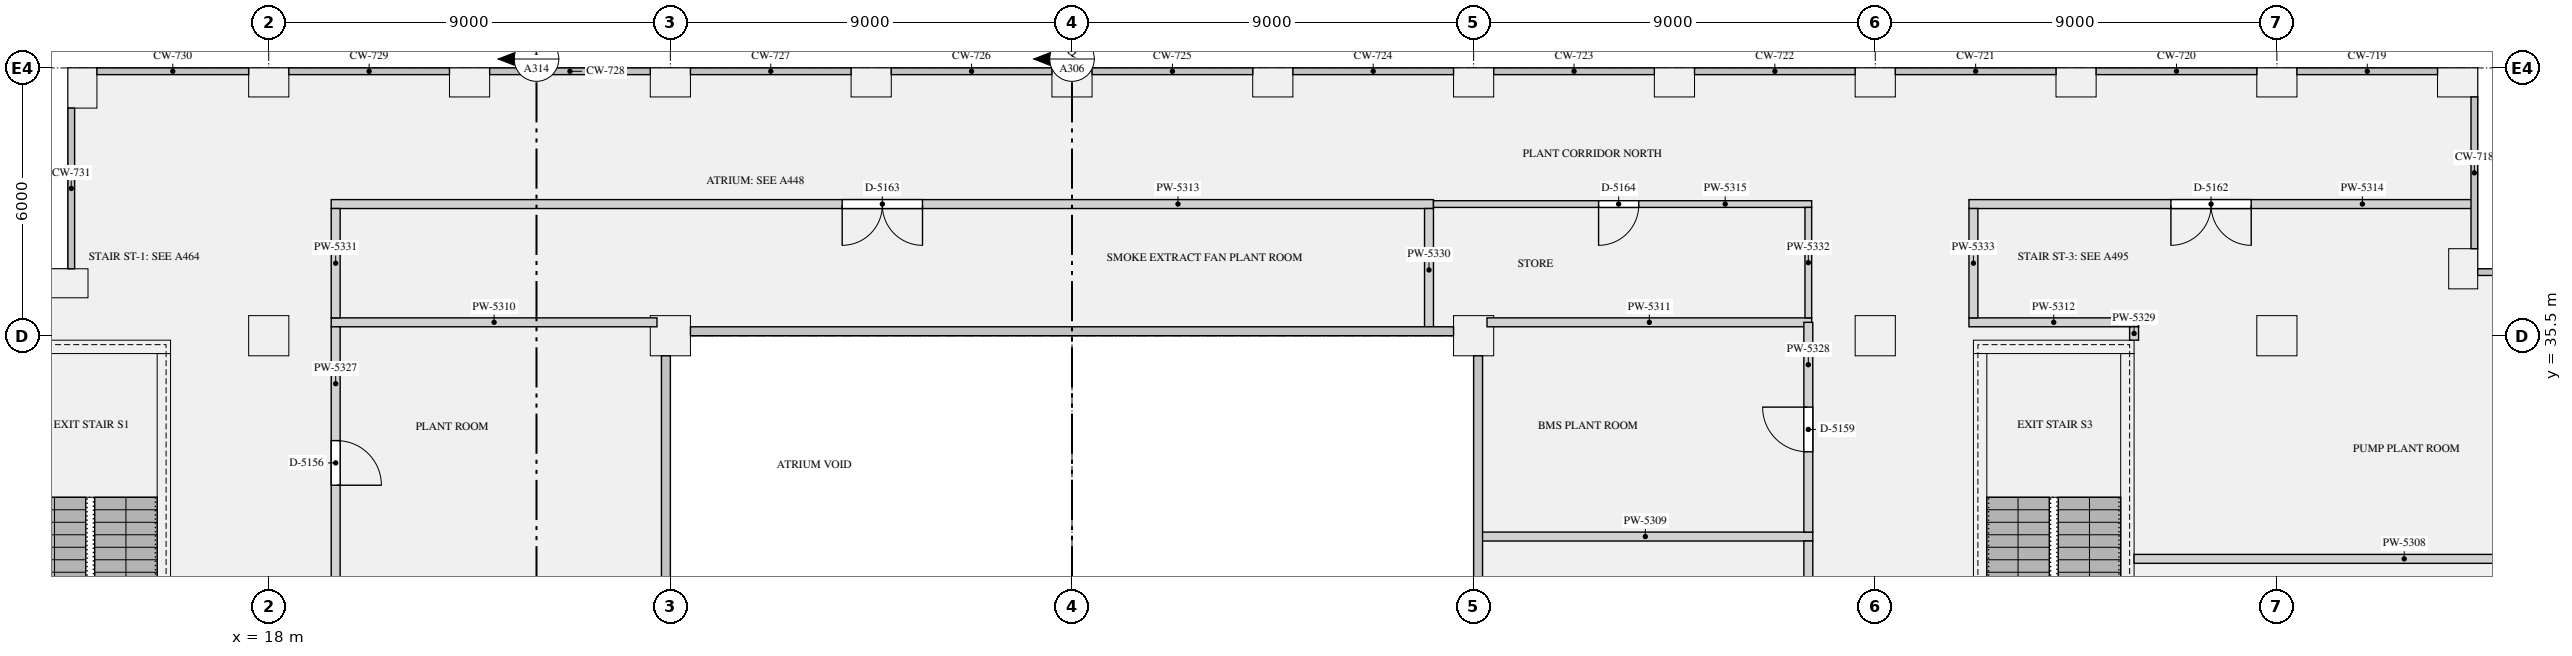
"""IFC4 building model, lengths in metres.
Left out: names, types, materials, properties, quantities, classifications, styles, units other than length and angle.
Written with IfcOpenShell. Run it as: python <this file> out.ifc"""

import sys

from ifc_helpers import new_model, si_unit, direction, frame, frame_2d, origin, origin_2d, place, context, subcontext, project, spatial, rectangle, extrude, element, fill, save


model = new_model("IFC4")
c1 = context("Model", 3, precision=1e-05, world=origin(), true_north=direction((0.0, 1.0)))
c2 = subcontext(c1, "Body", "Model", "MODEL_VIEW")
j1 = project(units=[si_unit("LENGTHUNIT", "METRE"), si_unit("PLANEANGLEUNIT", "RADIAN")], contexts=[c1])
p1 = place(None, origin())
s1 = spatial("IfcSite", under=j1, at=p1, CompositionType="ELEMENT")
p2 = place(p1, origin())
s2 = spatial("IfcBuilding", under=s1, at=p2, CompositionType="ELEMENT")
p3 = place(p2, frame((0.0, 0.0, 235.8)))
s3 = spatial("IfcBuildingStorey", under=s2, at=p3, CompositionType="ELEMENT", Elevation=235.8)
for number, where, z_axis, x_axis in (
    (1, (67.175, 37.0, 0.0), (0.0, 0.0, 1.0), (0.0, 1.0, 0.0)),
    (2, (67.05, 41.175, 0.0), (0.0, 0.0, 1.0), (-1.0, 0.0, 0.0)),
    (3, (63.0, 41.175, 0.0), (0.0, 0.0, 1.0), (-1.0, 0.0, 0.0)),
    (4, (58.5, 41.175, 0.0), (0.0, 0.0, 1.0), (-1.0, 0.0, 0.0)),
    (5, (54.0, 41.175, 0.0), (0.0, 0.0, 1.0), (-1.0, 0.0, 0.0)),
    (6, (49.5, 41.175, 0.0), (0.0, 0.0, 1.0), (-1.0, 0.0, 0.0)),
    (7, (45.0, 41.175, 0.0), (0.0, 0.0, 1.0), (-1.0, 0.0, 0.0)),
    (8, (40.5, 41.175, 0.0), (0.0, 0.0, 1.0), (-1.0, 0.0, 0.0)),
    (9, (36.0, 41.175, 0.0), (0.0, 0.0, 1.0), (-1.0, 0.0, 0.0)),
    (10, (31.5, 41.175, 0.0), (0.0, 0.0, 1.0), (-1.0, 0.0, 0.0)),
    (11, (27.0, 41.175, 0.0), (0.0, 0.0, 1.0), (-1.0, 0.0, 0.0)),
    (12, (22.5, 41.175, 0.0), (0.0, 0.0, 1.0), (-1.0, 0.0, 0.0)),
    (13, (18.0, 41.175, 0.0), (0.0, 0.0, 1.0), (-1.0, 0.0, 0.0)),
    (14, (13.825, 41.05, 0.0), (0.0, 0.0, 1.0), (0.0, -1.0, 0.0)),
    (15, (13.5, 36.675, 0.0), (0.0, 0.0, 1.0), (-1.0, 0.0, 0.0)),
):
    element("IfcColumn", number, at=place(p3, frame(where, z_axis=z_axis, x_axis=x_axis)), inside=s3, PredefinedType="USERDEFINED", context=c2, shape_type="SweptSolid", body=[
        extrude(rectangle(XDim=0.9, YDim=0.65, at=origin_2d()), origin(), (0.0, 0.0, 1.0), 4.2),
    ])
for number, where, z_axis, x_axis in (
    (16, (18.0, 35.5, 0.0), (0.0, 0.0, 1.0), (1.0, 0.0, 0.0)),
    (17, (27.0, 35.5, 0.0), (0.0, 0.0, 1.0), (1.0, 0.0, 0.0)),
    (18, (45.0, 35.5, 0.0), (0.0, 0.0, 1.0), (1.0, 0.0, 0.0)),
    (19, (54.0, 35.5, 0.0), (0.0, 0.0, 1.0), (1.0, 0.0, 0.0)),
    (20, (63.0, 35.5, 0.0), (0.0, 0.0, 1.0), (1.0, 0.0, 0.0)),
):
    element("IfcColumn", number, at=place(p3, frame(where, z_axis=z_axis, x_axis=x_axis)), inside=s3, PredefinedType="COLUMN", context=c2, shape_type="SweptSolid", body=[
        extrude(rectangle(XDim=0.9, YDim=0.9, at=origin_2d()), origin(), (0.0, 0.0, 1.0), 4.2),
    ])
p4 = place(p3, frame((12.2, 35.25, 0.0), z_axis=(0.0, 0.0, 1.0), x_axis=(1.0, 0.0, 0.0)))
e21 = element("IfcWall", 21, at=p4, inside=s3, PredefinedType="SHEAR", context=c2, shape_type="SweptSolid", body=[
    extrude(rectangle(XDim=3.6, YDim=0.3, at=frame_2d((1.8, 0.0))), origin(), (0.0, 0.0, 1.0), 4.2),
])
p5 = place(p3, frame((15.65, 27.3, 0.0), z_axis=(0.0, 0.0, 1.0), x_axis=(0.0, 1.0, 0.0)))
e22 = element("IfcWall", 22, at=p5, inside=s3, PredefinedType="SHEAR", context=c2, shape_type="SweptSolid", body=[
    extrude(rectangle(XDim=7.8, YDim=0.3, at=frame_2d((3.9, 0.0))), origin(), (0.0, 0.0, 1.0), 4.2),
])
p6 = place(p3, frame((56.2, 35.25, 0.0), z_axis=(0.0, 0.0, 1.0), x_axis=(1.0, 0.0, 0.0)))
e23 = element("IfcWall", 23, at=p6, inside=s3, PredefinedType="SHEAR", context=c2, shape_type="SweptSolid", body=[
    extrude(rectangle(XDim=3.6, YDim=0.3, at=frame_2d((1.8, 0.0))), origin(), (0.0, 0.0, 1.0), 4.2),
])
for number, where, z_axis, x_axis in (
    (24, (56.35, 27.3, 0.0), (0.0, 0.0, 1.0), (0.0, 1.0, 0.0)),
    (25, (59.65, 27.3, 0.0), (0.0, 0.0, 1.0), (0.0, 1.0, 0.0)),
):
    element("IfcWall", number, at=place(p3, frame(where, z_axis=z_axis, x_axis=x_axis)), inside=s3, PredefinedType="SHEAR", context=c2, shape_type="SweptSolid", body=[
        extrude(rectangle(XDim=7.8, YDim=0.3, at=frame_2d((3.9, 0.0))), origin(), (0.0, 0.0, 1.0), 4.2),
    ])
p7 = place(p3, frame((59.8, 30.5, 0.0), z_axis=(0.0, 0.0, 1.0), x_axis=(1.0, 0.0, 0.0)))
e26 = element("IfcWall", 26, at=p7, inside=s3, PredefinedType="PARTITIONING", context=c2, shape_type="SweptSolid", body=[
    extrude(rectangle(XDim=12.107, YDim=0.2, at=frame_2d((6.053, 0.0))), origin(), (0.0, 0.0, 1.0), 3.85),
])
p8 = place(p3, frame((45.096, 31.0, 0.0), z_axis=(0.0, 0.0, 1.0), x_axis=(1.0, 0.0, 0.0)))
e27 = element("IfcWall", 27, at=p8, inside=s3, PredefinedType="PARTITIONING", context=c2, shape_type="SweptSolid", body=[
    extrude(rectangle(XDim=7.504, YDim=0.2, at=frame_2d((3.752, 0.0))), origin(), (0.0, 0.0, 1.0), 3.85),
])
p9 = place(p3, frame((19.4, 35.8, 0.0), z_axis=(0.0, 0.0, 1.0), x_axis=(1.0, 0.0, 0.0)))
e28 = element("IfcWall", 28, at=p9, inside=s3, PredefinedType="PARTITIONING", context=c2, shape_type="SweptSolid", body=[
    extrude(rectangle(XDim=7.3, YDim=0.2, at=frame_2d((3.65, 0.0))), origin(), (0.0, 0.0, 1.0), 3.85),
])
p10 = place(p3, frame((45.3, 35.8, 0.0), z_axis=(0.0, 0.0, 1.0), x_axis=(1.0, 0.0, 0.0)))
e29 = element("IfcWall", 29, at=p10, inside=s3, PredefinedType="PARTITIONING", context=c2, shape_type="SweptSolid", body=[
    extrude(rectangle(XDim=7.275, YDim=0.2, at=frame_2d((3.637, 0.0))), origin(), (0.0, 0.0, 1.0), 3.85),
])
p11 = place(p3, frame((56.1, 35.8, 0.0), z_axis=(0.0, 0.0, 1.0), x_axis=(1.0, 0.0, 0.0)))
e30 = element("IfcWall", 30, at=p11, inside=s3, PredefinedType="PARTITIONING", context=c2, shape_type="SweptSolid", body=[
    extrude(rectangle(XDim=3.8, YDim=0.2, at=frame_2d((1.9, 0.0))), origin(), (0.0, 0.0, 1.0), 3.85),
])
p12 = place(p3, frame((19.4, 38.45, 0.0), z_axis=(0.0, 0.0, 1.0), x_axis=(1.0, 0.0, 0.0)))
e31 = element("IfcWall", 31, at=p12, inside=s3, PredefinedType="PARTITIONING", context=c2, shape_type="SweptSolid", body=[
    extrude(rectangle(XDim=24.7, YDim=0.2, at=frame_2d((12.35, 0.0))), origin(), (0.0, 0.0, 1.0), 3.85),
])
p13 = place(p12, frame((11.45, 0.0, 0.0)))
e32 = element("IfcOpeningElement", 32, at=p13, cuts=e31, PredefinedType="OPENING", context=c2, shape_type="SweptSolid", body=[
    extrude(rectangle(XDim=1.8, YDim=2.1, at=frame_2d((0.9, 1.05))), frame((0.0, 0.11, 0.0), z_axis=(0.0, -1.0, 0.0), x_axis=(1.0, 0.0, 0.0)), (0.0, 0.0, 1.0), 0.22),
])
p14 = place(p3, frame((56.1, 38.45, 0.0), z_axis=(0.0, 0.0, 1.0), x_axis=(1.0, 0.0, 0.0)))
e33 = element("IfcWall", 33, at=p14, inside=s3, PredefinedType="PARTITIONING", context=c2, shape_type="SweptSolid", body=[
    extrude(rectangle(XDim=11.307, YDim=0.2, at=frame_2d((5.653, 0.0))), origin(), (0.0, 0.0, 1.0), 3.85),
])
p15 = place(p14, frame((4.525, 0.0, 0.0)))
e34 = element("IfcOpeningElement", 34, at=p15, cuts=e33, PredefinedType="OPENING", context=c2, shape_type="SweptSolid", body=[
    extrude(rectangle(XDim=1.8, YDim=2.1, at=frame_2d((0.9, 1.05))), frame((0.0, 0.11, 0.0), z_axis=(0.0, -1.0, 0.0), x_axis=(1.0, 0.0, 0.0)), (0.0, 0.0, 1.0), 0.22),
])
p16 = place(p3, frame((44.1, 38.45, 0.0), z_axis=(0.0, 0.0, 1.0), x_axis=(1.0, 0.0, 0.0)))
e35 = element("IfcWall", 35, at=p16, inside=s3, PredefinedType="PARTITIONING", context=c2, shape_type="SweptSolid", body=[
    extrude(rectangle(XDim=8.475, YDim=0.15, at=frame_2d((4.237, 0.0))), origin(), (0.0, 0.0, 1.0), 3.85),
])
p17 = place(p16, frame((3.7, 0.0, 0.0)))
e36 = element("IfcOpeningElement", 36, at=p17, cuts=e35, PredefinedType="OPENING", context=c2, shape_type="SweptSolid", body=[
    extrude(rectangle(XDim=0.9, YDim=2.1, at=frame_2d((0.45, 1.05))), frame((0.0, 0.085, 0.0), z_axis=(0.0, -1.0, 0.0), x_axis=(1.0, 0.0, 0.0)), (0.0, 0.0, 1.0), 0.17),
])
p18 = place(p3, frame((52.5, 26.1, 0.0), z_axis=(0.0, 0.0, 1.0), x_axis=(0.0, 1.0, 0.0)))
e37 = element("IfcWall", 37, at=p18, inside=s3, PredefinedType="PARTITIONING", context=c2, shape_type="SweptSolid", body=[
    extrude(rectangle(XDim=4.8, YDim=0.2, at=frame_2d((2.4, 0.0))), origin(), (0.0, 0.0, 1.0), 3.85),
])
p19 = place(p18, frame((1.9, 0.0, 0.0)))
e38 = element("IfcOpeningElement", 38, at=p19, cuts=e37, PredefinedType="OPENING", context=c2, shape_type="SweptSolid", body=[
    extrude(rectangle(XDim=1.0, YDim=2.1, at=frame_2d((0.5, 1.05))), frame((0.0, 0.11, 0.0), z_axis=(0.0, -1.0, 0.0), x_axis=(1.0, 0.0, 0.0)), (0.0, 0.0, 1.0), 0.22),
])
p20 = place(p3, frame((19.5, 29.6, 0.0), z_axis=(0.0, 0.0, 1.0), x_axis=(0.0, 1.0, 0.0)))
e39 = element("IfcWall", 39, at=p20, inside=s3, PredefinedType="PARTITIONING", context=c2, shape_type="SweptSolid", body=[
    extrude(rectangle(XDim=6.1, YDim=0.2, at=frame_2d((3.05, 0.0))), origin(), (0.0, 0.0, 1.0), 3.85),
])
p21 = place(p20, frame((2.55, 0.0, 0.0)))
e40 = element("IfcOpeningElement", 40, at=p21, cuts=e39, PredefinedType="OPENING", context=c2, shape_type="SweptSolid", body=[
    extrude(rectangle(XDim=1.0, YDim=2.1, at=frame_2d((0.5, 1.05))), frame((0.0, 0.11, 0.0), z_axis=(0.0, -1.0, 0.0), x_axis=(1.0, 0.0, 0.0)), (0.0, 0.0, 1.0), 0.22),
])
p22 = place(p3, frame((52.5, 31.1, 0.0), z_axis=(0.0, 0.0, 1.0), x_axis=(0.0, 1.0, 0.0)))
e41 = element("IfcWall", 41, at=p22, inside=s3, PredefinedType="PARTITIONING", context=c2, shape_type="SweptSolid", body=[
    extrude(rectangle(XDim=4.7, YDim=0.2, at=frame_2d((2.35, 0.0))), origin(), (0.0, 0.0, 1.0), 3.85),
])
p23 = place(p22, frame((1.8, 0.0, 0.0)))
e42 = element("IfcOpeningElement", 42, at=p23, cuts=e41, PredefinedType="OPENING", context=c2, shape_type="SweptSolid", body=[
    extrude(rectangle(XDim=1.0, YDim=2.1, at=frame_2d((0.5, 1.05))), frame((0.0, 0.11, 0.0), z_axis=(0.0, -1.0, 0.0), x_axis=(1.0, 0.0, 0.0)), (0.0, 0.0, 1.0), 0.22),
])
p24 = place(p3, frame((59.8, 35.4, 0.0), z_axis=(0.0, 0.0, 1.0), x_axis=(0.0, 1.0, 0.0)))
e43 = element("IfcWall", 43, at=p24, inside=s3, PredefinedType="PARTITIONING", context=c2, shape_type="SweptSolid", body=[
    extrude(rectangle(XDim=0.3, YDim=0.2, at=frame_2d((0.15, 0.0))), origin(), (0.0, 0.0, 1.0), 3.85),
])
p25 = place(p3, frame((44.0, 35.596, 0.0), z_axis=(0.0, 0.0, 1.0), x_axis=(0.0, 1.0, 0.0)))
e44 = element("IfcWall", 44, at=p25, inside=s3, PredefinedType="PARTITIONING", context=c2, shape_type="SweptSolid", body=[
    extrude(rectangle(XDim=2.754, YDim=0.2, at=frame_2d((1.377, 0.0))), origin(), (0.0, 0.0, 1.0), 3.85),
])
p26 = place(p3, frame((19.5, 35.9, 0.0), z_axis=(0.0, 0.0, 1.0), x_axis=(0.0, 1.0, 0.0)))
e45 = element("IfcWall", 45, at=p26, inside=s3, PredefinedType="PARTITIONING", context=c2, shape_type="SweptSolid", body=[
    extrude(rectangle(XDim=2.45, YDim=0.2, at=frame_2d((1.225, 0.0))), origin(), (0.0, 0.0, 1.0), 3.85),
])
p27 = place(p3, frame((52.5, 35.9, 0.0), z_axis=(0.0, 0.0, 1.0), x_axis=(0.0, 1.0, 0.0)))
e46 = element("IfcWall", 46, at=p27, inside=s3, PredefinedType="PARTITIONING", context=c2, shape_type="SweptSolid", body=[
    extrude(rectangle(XDim=2.475, YDim=0.15, at=frame_2d((1.238, 0.0))), origin(), (0.0, 0.0, 1.0), 3.85),
])
p28 = place(p3, frame((56.2, 35.9, 0.0), z_axis=(0.0, 0.0, 1.0), x_axis=(0.0, 1.0, 0.0)))
e47 = element("IfcWall", 47, at=p28, inside=s3, PredefinedType="PARTITIONING", context=c2, shape_type="SweptSolid", body=[
    extrude(rectangle(XDim=2.45, YDim=0.2, at=frame_2d((1.225, 0.0))), origin(), (0.0, 0.0, 1.0), 3.85),
])
p29 = place(p21, frame((1.0, 0.0, 0.0), z_axis=(0.0, 0.0, 1.0), x_axis=(-1.0, 0.0, 0.0)))
e48 = element("IfcDoor", 48, at=p29, inside=s3, OperationType="SINGLE_SWING_RIGHT", PredefinedType="DOOR", context=c2, shape_type="SweptSolid", body=[
    extrude(rectangle(XDim=1.0, YDim=2.1, at=frame_2d((0.5, 1.05))), frame((0.0, 0.025, 0.0), z_axis=(0.0, -1.0, 0.0), x_axis=(1.0, 0.0, 0.0)), (0.0, 0.0, 1.0), 0.05),
])
fill(e40, e48)
p30 = place(p23, origin())
e49 = element("IfcDoor", 49, at=p30, inside=s3, OperationType="SINGLE_SWING_RIGHT", PredefinedType="DOOR", context=c2, shape_type="SweptSolid", body=[
    extrude(rectangle(XDim=1.0, YDim=2.1, at=frame_2d((0.5, 1.05))), frame((0.0, 0.025, 0.0), z_axis=(0.0, -1.0, 0.0), x_axis=(1.0, 0.0, 0.0)), (0.0, 0.0, 1.0), 0.05),
])
fill(e42, e49)
p31 = place(p15, frame((1.8, 0.0, 0.0), z_axis=(0.0, 0.0, 1.0), x_axis=(-1.0, 0.0, 0.0)))
e50 = element("IfcDoor", 50, at=p31, inside=s3, OperationType="DOUBLE_DOOR_SINGLE_SWING", PredefinedType="DOOR", context=c2, shape_type="SweptSolid", body=[
    extrude(rectangle(XDim=1.8, YDim=2.1, at=frame_2d((0.9, 1.05))), frame((0.0, 0.025, 0.0), z_axis=(0.0, -1.0, 0.0), x_axis=(1.0, 0.0, 0.0)), (0.0, 0.0, 1.0), 0.05),
])
fill(e34, e50)
p32 = place(p13, frame((1.8, 0.0, 0.0), z_axis=(0.0, 0.0, 1.0), x_axis=(-1.0, 0.0, 0.0)))
e51 = element("IfcDoor", 51, at=p32, inside=s3, OperationType="DOUBLE_DOOR_SINGLE_SWING", PredefinedType="DOOR", context=c2, shape_type="SweptSolid", body=[
    extrude(rectangle(XDim=1.8, YDim=2.1, at=frame_2d((0.9, 1.05))), frame((0.0, 0.025, 0.0), z_axis=(0.0, -1.0, 0.0), x_axis=(1.0, 0.0, 0.0)), (0.0, 0.0, 1.0), 0.05),
])
fill(e32, e51)
p33 = place(p17, frame((0.9, 0.0, 0.0), z_axis=(0.0, 0.0, 1.0), x_axis=(-1.0, 0.0, 0.0)))
e52 = element("IfcDoor", 52, at=p33, inside=s3, OperationType="SINGLE_SWING_RIGHT", PredefinedType="DOOR", context=c2, shape_type="SweptSolid", body=[
    extrude(rectangle(XDim=0.9, YDim=2.1, at=frame_2d((0.45, 1.05))), frame((0.0, 0.025, 0.0), z_axis=(0.0, -1.0, 0.0), x_axis=(1.0, 0.0, 0.0)), (0.0, 0.0, 1.0), 0.05),
])
fill(e36, e52)
save(model, sys.argv[1])
